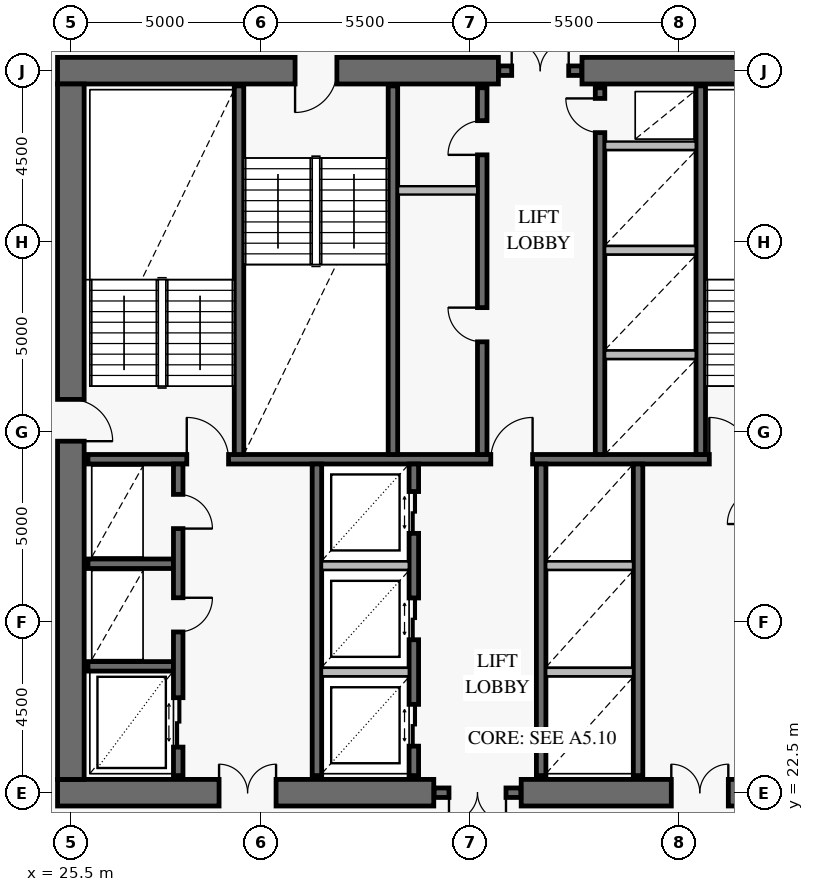
"""IFC4 building model, lengths in metres.
Left out: names, types, materials, properties, quantities, classifications, styles, units other than length and angle.
Written with IfcOpenShell. Run it as: python <this file> out.ifc"""

import sys

from ifc_helpers import new_model, si_unit, direction, frame, frame_2d, origin, place, context, subcontext, project, spatial, rectangle, extrude, element, fill, save


model = new_model("IFC4")
c1 = context("Model", 3, precision=1e-05, world=origin(), true_north=direction((0.0, 1.0)))
c2 = subcontext(c1, "Body", "Model", "MODEL_VIEW")
j1 = project(units=[si_unit("LENGTHUNIT", "METRE"), si_unit("PLANEANGLEUNIT", "RADIAN")], contexts=[c1])
p1 = place(None, origin())
s1 = spatial("IfcSite", under=j1, at=p1, CompositionType="ELEMENT")
p2 = place(p1, origin())
s2 = spatial("IfcBuilding", under=s1, at=p2, CompositionType="ELEMENT")
p3 = place(p2, frame((0.0, 0.0, 115.2)))
s3 = spatial("IfcBuildingStorey", under=s2, at=p3, CompositionType="ELEMENT", Elevation=115.2)
p4 = place(p3, frame((25.15, 22.5, 0.0), z_axis=(0.0, 0.0, 1.0), x_axis=(1.0, 0.0, 0.0)))
e1 = element("IfcWall", 1, at=p4, inside=s3, PredefinedType="SHEAR", context=c2, shape_type="SweptSolid", body=[
    extrude(rectangle(XDim=9.9, YDim=0.7, at=frame_2d((4.95, 0.0))), origin(), (0.0, 0.0, 1.0), 3.8),
])
p5 = place(p4, frame((4.25, 0.0, 0.0)))
e2 = element("IfcOpeningElement", 2, at=p5, cuts=e1, PredefinedType="OPENING", context=c2, shape_type="SweptSolid", body=[
    extrude(rectangle(XDim=1.5, YDim=2.15, at=frame_2d((0.75, 1.075))), frame((0.0, 0.362, 0.0), z_axis=(0.0, -1.0, 0.0), x_axis=(1.0, 0.0, 0.0)), (0.0, 0.0, 1.0), 0.724),
])
p6 = place(p3, frame((37.35, 22.5, 0.0), z_axis=(0.0, 0.0, 1.0), x_axis=(1.0, 0.0, 0.0)))
e3 = element("IfcWall", 3, at=p6, inside=s3, PredefinedType="SHEAR", context=c2, shape_type="SweptSolid", body=[
    extrude(rectangle(XDim=9.5, YDim=0.7, at=frame_2d((4.75, 0.0))), origin(), (0.0, 0.0, 1.0), 3.8),
])
p7 = place(p6, frame((3.95, 0.0, 0.0)))
e4 = element("IfcOpeningElement", 4, at=p7, cuts=e3, PredefinedType="OPENING", context=c2, shape_type="SweptSolid", body=[
    extrude(rectangle(XDim=1.5, YDim=2.15, at=frame_2d((0.75, 1.075))), frame((0.0, 0.362, 0.0), z_axis=(0.0, -1.0, 0.0), x_axis=(1.0, 0.0, 0.0)), (0.0, 0.0, 1.0), 0.724),
])
p8 = place(p3, frame((46.85, 41.5, 0.0), z_axis=(0.0, 0.0, 1.0), x_axis=(-1.0, 0.0, 0.0)))
e5 = element("IfcWall", 5, at=p8, inside=s3, PredefinedType="SHEAR", context=c2, shape_type="SweptSolid", body=[
    extrude(rectangle(XDim=7.9, YDim=0.7, at=frame_2d((3.95, 0.0))), origin(), (0.0, 0.0, 1.0), 3.8),
])
p9 = place(p3, frame((36.75, 41.5, 0.0), z_axis=(0.0, 0.0, 1.0), x_axis=(-1.0, 0.0, 0.0)))
e6 = element("IfcWall", 6, at=p9, inside=s3, PredefinedType="SHEAR", context=c2, shape_type="SweptSolid", body=[
    extrude(rectangle(XDim=11.6, YDim=0.7, at=frame_2d((5.8, 0.0))), origin(), (0.0, 0.0, 1.0), 3.8),
])
p10 = place(p9, frame((4.25, 0.0, 0.0)))
e7 = element("IfcOpeningElement", 7, at=p10, cuts=e6, PredefinedType="OPENING", context=c2, shape_type="SweptSolid", body=[
    extrude(rectangle(XDim=1.1, YDim=2.15, at=frame_2d((0.55, 1.075))), frame((0.0, 0.362, 0.0), z_axis=(0.0, -1.0, 0.0), x_axis=(1.0, 0.0, 0.0)), (0.0, 0.0, 1.0), 0.724),
])
p11 = place(p3, frame((25.5, 22.85, 0.0), z_axis=(0.0, 0.0, 1.0), x_axis=(0.0, 1.0, 0.0)))
e8 = element("IfcWall", 8, at=p11, inside=s3, PredefinedType="SHEAR", context=c2, shape_type="SweptSolid", body=[
    extrude(rectangle(XDim=18.3, YDim=0.7, at=frame_2d((9.15, 0.0))), origin(), (0.0, 0.0, 1.0), 3.8),
])
p12 = place(p11, frame((8.9, 0.0, 0.0)))
e9 = element("IfcOpeningElement", 9, at=p12, cuts=e8, PredefinedType="OPENING", context=c2, shape_type="SweptSolid", body=[
    extrude(rectangle(XDim=1.1, YDim=2.15, at=frame_2d((0.55, 1.075))), frame((0.0, 0.362, 0.0), z_axis=(0.0, -1.0, 0.0), x_axis=(1.0, 0.0, 0.0)), (0.0, 0.0, 1.0), 0.724),
])
p13 = place(p3, frame((35.06, 22.5, 0.0), z_axis=(0.0, 0.0, 1.0), x_axis=(1.0, 0.0, 0.0)))
e10 = element("IfcWall", 10, at=p13, inside=s3, PredefinedType="SOLIDWALL", context=c2, shape_type="SweptSolid", body=[
    extrude(rectangle(XDim=2.28, YDim=0.25, at=frame_2d((1.14, 0.0))), origin(), (0.0, 0.0, 1.0), 3.8),
])
p14 = place(p13, frame((0.39, 0.0, 0.0)))
e11 = element("IfcOpeningElement", 11, at=p14, cuts=e10, PredefinedType="OPENING", context=c2, shape_type="SweptSolid", body=[
    extrude(rectangle(XDim=1.5, YDim=2.15, at=frame_2d((0.75, 1.075))), frame((0.0, 0.137, 0.0), z_axis=(0.0, -1.0, 0.0), x_axis=(1.0, 0.0, 0.0)), (0.0, 0.0, 1.0), 0.274),
])
p15 = place(p3, frame((36.76, 41.5, 0.0), z_axis=(0.0, 0.0, 1.0), x_axis=(1.0, 0.0, 0.0)))
e12 = element("IfcWall", 12, at=p15, inside=s3, PredefinedType="SOLIDWALL", context=c2, shape_type="SweptSolid", body=[
    extrude(rectangle(XDim=2.18, YDim=0.25, at=frame_2d((1.09, 0.0))), origin(), (0.0, 0.0, 1.0), 3.8),
])
p16 = place(p15, frame((0.34, 0.0, 0.0)))
e13 = element("IfcOpeningElement", 13, at=p16, cuts=e12, PredefinedType="OPENING", context=c2, shape_type="SweptSolid", body=[
    extrude(rectangle(XDim=1.5, YDim=2.15, at=frame_2d((0.75, 1.075))), frame((0.0, 0.137, 0.0), z_axis=(0.0, -1.0, 0.0), x_axis=(1.0, 0.0, 0.0)), (0.0, 0.0, 1.0), 0.274),
])
p17 = place(p3, frame((25.95, 31.275, 0.0), z_axis=(0.0, 0.0, 1.0), x_axis=(1.0, 0.0, 0.0)))
e14 = element("IfcWall", 14, at=p17, inside=s3, PredefinedType="SOLIDWALL", context=c2, shape_type="SweptSolid", body=[
    extrude(rectangle(XDim=20.1, YDim=0.25, at=frame_2d((10.05, 0.0))), origin(), (0.0, 0.0, 1.0), 3.8),
])
p18 = place(p17, frame((2.6, 0.0, 0.0)))
e15 = element("IfcOpeningElement", 15, at=p18, cuts=e14, PredefinedType="OPENING", context=c2, shape_type="SweptSolid", body=[
    extrude(rectangle(XDim=1.1, YDim=2.15, at=frame_2d((0.55, 1.075))), frame((0.0, 0.137, 0.0), z_axis=(0.0, -1.0, 0.0), x_axis=(1.0, 0.0, 0.0)), (0.0, 0.0, 1.0), 0.274),
])
p19 = place(p17, frame((10.6, 0.0, 0.0)))
e16 = element("IfcOpeningElement", 16, at=p19, cuts=e14, PredefinedType="OPENING", context=c2, shape_type="SweptSolid", body=[
    extrude(rectangle(XDim=1.1, YDim=2.15, at=frame_2d((0.55, 1.075))), frame((0.0, 0.137, 0.0), z_axis=(0.0, -1.0, 0.0), x_axis=(1.0, 0.0, 0.0)), (0.0, 0.0, 1.0), 0.274),
])
p20 = place(p17, frame((16.35, 0.0, 0.0)))
e17 = element("IfcOpeningElement", 17, at=p20, cuts=e14, PredefinedType="OPENING", context=c2, shape_type="SweptSolid", body=[
    extrude(rectangle(XDim=1.1, YDim=2.15, at=frame_2d((0.55, 1.075))), frame((0.0, 0.137, 0.0), z_axis=(0.0, -1.0, 0.0), x_axis=(1.0, 0.0, 0.0)), (0.0, 0.0, 1.0), 0.274),
])
for number, where, z_axis, x_axis in (
    (18, (29.925, 31.4, 0.0), (0.0, 0.0, 1.0), (0.0, 1.0, 0.0)),
    (19, (33.975, 31.4, 0.0), (0.0, 0.0, 1.0), (0.0, 1.0, 0.0)),
    (20, (42.075, 31.4, 0.0), (0.0, 0.0, 1.0), (0.0, 1.0, 0.0)),
):
    element("IfcWall", number, at=place(p3, frame(where, z_axis=z_axis, x_axis=x_axis)), inside=s3, PredefinedType="SOLIDWALL", context=c2, shape_type="SweptSolid", body=[
        extrude(rectangle(XDim=9.7, YDim=0.25, at=frame_2d((4.85, 0.0))), origin(), (0.0, 0.0, 1.0), 3.8),
    ])
p21 = place(p3, frame((36.325, 31.4, 0.0), z_axis=(0.0, 0.0, 1.0), x_axis=(0.0, 1.0, 0.0)))
e21 = element("IfcWall", 21, at=p21, inside=s3, PredefinedType="SOLIDWALL", context=c2, shape_type="SweptSolid", body=[
    extrude(rectangle(XDim=9.65, YDim=0.25, at=frame_2d((4.825, 0.0))), origin(), (0.0, 0.0, 1.0), 3.8),
])
p22 = place(p21, frame((2.965, 0.0, 0.0)))
e22 = element("IfcOpeningElement", 22, at=p22, cuts=e21, PredefinedType="OPENING", context=c2, shape_type="SweptSolid", body=[
    extrude(rectangle(XDim=0.9, YDim=2.1, at=frame_2d((0.45, 1.05))), frame((0.0, 0.137, 0.0), z_axis=(0.0, -1.0, 0.0), x_axis=(1.0, 0.0, 0.0)), (0.0, 0.0, 1.0), 0.274),
])
p23 = place(p21, frame((7.885, 0.0, 0.0)))
e23 = element("IfcOpeningElement", 23, at=p23, cuts=e21, PredefinedType="OPENING", context=c2, shape_type="SweptSolid", body=[
    extrude(rectangle(XDim=0.9, YDim=2.1, at=frame_2d((0.45, 1.05))), frame((0.0, 0.137, 0.0), z_axis=(0.0, -1.0, 0.0), x_axis=(1.0, 0.0, 0.0)), (0.0, 0.0, 1.0), 0.274),
])
p24 = place(p3, frame((39.425, 31.4, 0.0), z_axis=(0.0, 0.0, 1.0), x_axis=(0.0, 1.0, 0.0)))
e24 = element("IfcWall", 24, at=p24, inside=s3, PredefinedType="SOLIDWALL", context=c2, shape_type="SweptSolid", body=[
    extrude(rectangle(XDim=9.65, YDim=0.25, at=frame_2d((4.825, 0.0))), origin(), (0.0, 0.0, 1.0), 3.8),
])
p25 = place(p24, frame((8.47, 0.0, 0.0)))
e25 = element("IfcOpeningElement", 25, at=p25, cuts=e24, PredefinedType="OPENING", context=c2, shape_type="SweptSolid", body=[
    extrude(rectangle(XDim=0.9, YDim=2.1, at=frame_2d((0.45, 1.05))), frame((0.0, 0.137, 0.0), z_axis=(0.0, -1.0, 0.0), x_axis=(1.0, 0.0, 0.0)), (0.0, 0.0, 1.0), 0.274),
])
for number, where, z_axis, x_axis in (
    (26, (25.95, 25.825, 0.0), (0.0, 0.0, 1.0), (1.0, 0.0, 0.0)),
    (27, (25.95, 28.525, 0.0), (0.0, 0.0, 1.0), (1.0, 0.0, 0.0)),
):
    element("IfcWall", number, at=place(p3, frame(where, z_axis=z_axis, x_axis=x_axis)), inside=s3, PredefinedType="SOLIDWALL", context=c2, shape_type="SweptSolid", body=[
        extrude(rectangle(XDim=2.25, YDim=0.25, at=frame_2d((1.125, 0.0))), origin(), (0.0, 0.0, 1.0), 3.8),
    ])
p26 = place(p3, frame((28.325, 22.95, 0.0), z_axis=(0.0, 0.0, 1.0), x_axis=(0.0, 1.0, 0.0)))
e28 = element("IfcWall", 28, at=p26, inside=s3, PredefinedType="SOLIDWALL", context=c2, shape_type="SweptSolid", body=[
    extrude(rectangle(XDim=8.2, YDim=0.25, at=frame_2d((4.1, 0.0))), origin(), (0.0, 0.0, 1.0), 3.8),
])
p27 = place(p26, frame((0.75, 0.0, 0.0)))
e29 = element("IfcOpeningElement", 29, at=p27, cuts=e28, PredefinedType="OPENING", context=c2, shape_type="SweptSolid", body=[
    extrude(rectangle(XDim=1.3, YDim=2.3, at=frame_2d((0.65, 1.15))), frame((0.0, 0.137, 0.0), z_axis=(0.0, -1.0, 0.0), x_axis=(1.0, 0.0, 0.0)), (0.0, 0.0, 1.0), 0.274),
])
p28 = place(p26, frame((3.78, 0.0, 0.0)))
e30 = element("IfcOpeningElement", 30, at=p28, cuts=e28, PredefinedType="OPENING", context=c2, shape_type="SweptSolid", body=[
    extrude(rectangle(XDim=0.9, YDim=2.1, at=frame_2d((0.45, 1.05))), frame((0.0, 0.137, 0.0), z_axis=(0.0, -1.0, 0.0), x_axis=(1.0, 0.0, 0.0)), (0.0, 0.0, 1.0), 0.274),
])
p29 = place(p26, frame((6.5, 0.0, 0.0)))
e31 = element("IfcOpeningElement", 31, at=p29, cuts=e28, PredefinedType="OPENING", context=c2, shape_type="SweptSolid", body=[
    extrude(rectangle(XDim=0.9, YDim=2.1, at=frame_2d((0.45, 1.05))), frame((0.0, 0.137, 0.0), z_axis=(0.0, -1.0, 0.0), x_axis=(1.0, 0.0, 0.0)), (0.0, 0.0, 1.0), 0.274),
])
p30 = place(p3, frame((31.975, 22.95, 0.0), z_axis=(0.0, 0.0, 1.0), x_axis=(0.0, 1.0, 0.0)))
e32 = element("IfcWall", 32, at=p30, inside=s3, PredefinedType="SOLIDWALL", context=c2, shape_type="SweptSolid", body=[
    extrude(rectangle(XDim=8.2, YDim=0.25, at=frame_2d((4.1, 0.0))), origin(), (0.0, 0.0, 1.0), 3.8),
])
p31 = place(p3, frame((34.525, 22.95, 0.0), z_axis=(0.0, 0.0, 1.0), x_axis=(0.0, 1.0, 0.0)))
e33 = element("IfcWall", 33, at=p31, inside=s3, PredefinedType="SOLIDWALL", context=c2, shape_type="SweptSolid", body=[
    extrude(rectangle(XDim=8.2, YDim=0.25, at=frame_2d((4.1, 0.0))), origin(), (0.0, 0.0, 1.0), 3.8),
])
p32 = place(p31, frame((0.775, 0.0, 0.0)))
e34 = element("IfcOpeningElement", 34, at=p32, cuts=e33, PredefinedType="OPENING", context=c2, shape_type="SweptSolid", body=[
    extrude(rectangle(XDim=1.1, YDim=2.2, at=frame_2d((0.55, 1.1))), frame((0.0, 0.137, 0.0), z_axis=(0.0, -1.0, 0.0), x_axis=(1.0, 0.0, 0.0)), (0.0, 0.0, 1.0), 0.274),
])
p33 = place(p31, frame((3.575, 0.0, 0.0)))
e35 = element("IfcOpeningElement", 35, at=p33, cuts=e33, PredefinedType="OPENING", context=c2, shape_type="SweptSolid", body=[
    extrude(rectangle(XDim=1.1, YDim=2.2, at=frame_2d((0.55, 1.1))), frame((0.0, 0.137, 0.0), z_axis=(0.0, -1.0, 0.0), x_axis=(1.0, 0.0, 0.0)), (0.0, 0.0, 1.0), 0.274),
])
p34 = place(p31, frame((6.375, 0.0, 0.0)))
e36 = element("IfcOpeningElement", 36, at=p34, cuts=e33, PredefinedType="OPENING", context=c2, shape_type="SweptSolid", body=[
    extrude(rectangle(XDim=1.1, YDim=2.2, at=frame_2d((0.55, 1.1))), frame((0.0, 0.137, 0.0), z_axis=(0.0, -1.0, 0.0), x_axis=(1.0, 0.0, 0.0)), (0.0, 0.0, 1.0), 0.274),
])
for number, where, z_axis, x_axis in (
    (37, (37.875, 22.95, 0.0), (0.0, 0.0, 1.0), (0.0, 1.0, 0.0)),
    (38, (40.425, 22.95, 0.0), (0.0, 0.0, 1.0), (0.0, 1.0, 0.0)),
):
    element("IfcWall", number, at=place(p3, frame(where, z_axis=z_axis, x_axis=x_axis)), inside=s3, PredefinedType="SOLIDWALL", context=c2, shape_type="SweptSolid", body=[
        extrude(rectangle(XDim=8.2, YDim=0.25, at=frame_2d((4.1, 0.0))), origin(), (0.0, 0.0, 1.0), 3.8),
    ])
p35 = place(p3, frame((34.108, 38.35, 0.0), z_axis=(0.0, 0.0, 1.0), x_axis=(1.0, 0.0, 0.0)))
e39 = element("IfcWall", 39, at=p35, inside=s3, PredefinedType="PARTITIONING", context=c2, shape_type="SweptSolid", body=[
    extrude(rectangle(XDim=2.084, YDim=0.22, at=frame_2d((1.042, 0.0))), origin(), (0.0, 0.0, 1.0), 3.55),
])
for number, where, z_axis, x_axis in (
    (40, (39.558, 34.025, 0.0), (0.0, 0.0, 1.0), (1.0, 0.0, 0.0)),
    (41, (39.558, 36.775, 0.0), (0.0, 0.0, 1.0), (1.0, 0.0, 0.0)),
    (42, (39.558, 39.525, 0.0), (0.0, 0.0, 1.0), (1.0, 0.0, 0.0)),
):
    element("IfcWall", number, at=place(p3, frame(where, z_axis=z_axis, x_axis=x_axis)), inside=s3, PredefinedType="PARTITIONING", context=c2, shape_type="SweptSolid", body=[
        extrude(rectangle(XDim=2.384, YDim=0.22, at=frame_2d((1.192, 0.0))), origin(), (0.0, 0.0, 1.0), 3.55),
    ])
for number, where, z_axis, x_axis in (
    (43, (32.108, 25.675, 0.0), (0.0, 0.0, 1.0), (1.0, 0.0, 0.0)),
    (44, (32.108, 28.475, 0.0), (0.0, 0.0, 1.0), (1.0, 0.0, 0.0)),
):
    element("IfcWall", number, at=place(p3, frame(where, z_axis=z_axis, x_axis=x_axis)), inside=s3, PredefinedType="PARTITIONING", context=c2, shape_type="SweptSolid", body=[
        extrude(rectangle(XDim=2.284, YDim=0.22, at=frame_2d((1.142, 0.0))), origin(), (0.0, 0.0, 1.0), 3.55),
    ])
for number, where, z_axis, x_axis in (
    (45, (38.008, 25.675, 0.0), (0.0, 0.0, 1.0), (1.0, 0.0, 0.0)),
    (46, (38.008, 28.475, 0.0), (0.0, 0.0, 1.0), (1.0, 0.0, 0.0)),
):
    element("IfcWall", number, at=place(p3, frame(where, z_axis=z_axis, x_axis=x_axis)), inside=s3, PredefinedType="PARTITIONING", context=c2, shape_type="SweptSolid", body=[
        extrude(rectangle(XDim=2.284, YDim=0.22, at=frame_2d((1.142, 0.0))), origin(), (0.0, 0.0, 1.0), 3.55),
    ])
p36 = place(p3, frame((20.956, 22.313, 0.0), z_axis=(0.0, 0.0, 1.0), x_axis=(0.601821242671, -0.798630823265, 0.0)))
e47 = element("IfcWall", 47, at=p36, inside=s3, PredefinedType="PARTITIONING", context=c2, shape_type="SweptSolid", body=[
    extrude(rectangle(XDim=7.393, YDim=0.12, at=frame_2d((3.697, 0.0))), origin(), (0.0, 0.0, 1.0), 2.85),
])
p37 = place(p12, frame((1.1, 0.0, 0.0), z_axis=(0.0, 0.0, 1.0), x_axis=(-1.0, 0.0, 0.0)))
e48 = element("IfcDoor", 48, at=p37, inside=s3, OperationType="SINGLE_SWING_RIGHT", PredefinedType="USERDEFINED", context=c2, shape_type="SweptSolid", body=[
    extrude(rectangle(XDim=1.1, YDim=2.15, at=frame_2d((0.55, 1.075))), frame((0.0, 0.025, 0.0), z_axis=(0.0, -1.0, 0.0), x_axis=(1.0, 0.0, 0.0)), (0.0, 0.0, 1.0), 0.05),
])
fill(e9, e48)
p38 = place(p10, origin())
e49 = element("IfcDoor", 49, at=p38, inside=s3, OperationType="SINGLE_SWING_RIGHT", PredefinedType="USERDEFINED", context=c2, shape_type="SweptSolid", body=[
    extrude(rectangle(XDim=1.1, YDim=2.15, at=frame_2d((0.55, 1.075))), frame((0.0, 0.025, 0.0), z_axis=(0.0, -1.0, 0.0), x_axis=(1.0, 0.0, 0.0)), (0.0, 0.0, 1.0), 0.05),
])
fill(e7, e49)
p39 = place(p5, origin())
e50 = element("IfcDoor", 50, at=p39, inside=s3, OperationType="DOUBLE_DOOR_SINGLE_SWING", PredefinedType="DOOR", context=c2, shape_type="SweptSolid", body=[
    extrude(rectangle(XDim=1.5, YDim=2.15, at=frame_2d((0.75, 1.075))), frame((0.0, 0.025, 0.0), z_axis=(0.0, -1.0, 0.0), x_axis=(1.0, 0.0, 0.0)), (0.0, 0.0, 1.0), 0.05),
])
fill(e2, e50)
p40 = place(p7, origin())
e51 = element("IfcDoor", 51, at=p40, inside=s3, OperationType="DOUBLE_DOOR_SINGLE_SWING", PredefinedType="DOOR", context=c2, shape_type="SweptSolid", body=[
    extrude(rectangle(XDim=1.5, YDim=2.15, at=frame_2d((0.75, 1.075))), frame((0.0, 0.025, 0.0), z_axis=(0.0, -1.0, 0.0), x_axis=(1.0, 0.0, 0.0)), (0.0, 0.0, 1.0), 0.05),
])
fill(e4, e51)
p41 = place(p14, frame((1.5, 0.0, 0.0), z_axis=(0.0, 0.0, 1.0), x_axis=(-1.0, 0.0, 0.0)))
e52 = element("IfcDoor", 52, at=p41, inside=s3, OperationType="DOUBLE_DOOR_SINGLE_SWING", PredefinedType="DOOR", context=c2, shape_type="SweptSolid", body=[
    extrude(rectangle(XDim=1.5, YDim=2.15, at=frame_2d((0.75, 1.075))), frame((0.0, 0.025, 0.0), z_axis=(0.0, -1.0, 0.0), x_axis=(1.0, 0.0, 0.0)), (0.0, 0.0, 1.0), 0.05),
])
fill(e11, e52)
p42 = place(p16, origin())
e53 = element("IfcDoor", 53, at=p42, inside=s3, OperationType="DOUBLE_DOOR_SINGLE_SWING", PredefinedType="DOOR", context=c2, shape_type="SweptSolid", body=[
    extrude(rectangle(XDim=1.5, YDim=2.15, at=frame_2d((0.75, 1.075))), frame((0.0, 0.025, 0.0), z_axis=(0.0, -1.0, 0.0), x_axis=(1.0, 0.0, 0.0)), (0.0, 0.0, 1.0), 0.05),
])
fill(e13, e53)
p43 = place(p18, origin())
e54 = element("IfcDoor", 54, at=p43, inside=s3, OperationType="SINGLE_SWING_LEFT", PredefinedType="USERDEFINED", context=c2, shape_type="SweptSolid", body=[
    extrude(rectangle(XDim=1.1, YDim=2.15, at=frame_2d((0.55, 1.075))), frame((0.0, 0.025, 0.0), z_axis=(0.0, -1.0, 0.0), x_axis=(1.0, 0.0, 0.0)), (0.0, 0.0, 1.0), 0.05),
])
fill(e15, e54)
p44 = place(p19, origin())
e55 = element("IfcDoor", 55, at=p44, inside=s3, OperationType="SINGLE_SWING_RIGHT", PredefinedType="USERDEFINED", context=c2, shape_type="SweptSolid", body=[
    extrude(rectangle(XDim=1.1, YDim=2.15, at=frame_2d((0.55, 1.075))), frame((0.0, 0.025, 0.0), z_axis=(0.0, -1.0, 0.0), x_axis=(1.0, 0.0, 0.0)), (0.0, 0.0, 1.0), 0.05),
])
fill(e16, e55)
p45 = place(p20, origin())
e56 = element("IfcDoor", 56, at=p45, inside=s3, OperationType="SINGLE_SWING_LEFT", PredefinedType="USERDEFINED", context=c2, shape_type="SweptSolid", body=[
    extrude(rectangle(XDim=1.1, YDim=2.15, at=frame_2d((0.55, 1.075))), frame((0.0, 0.025, 0.0), z_axis=(0.0, -1.0, 0.0), x_axis=(1.0, 0.0, 0.0)), (0.0, 0.0, 1.0), 0.05),
])
fill(e17, e56)
p46 = place(p22, origin())
e57 = element("IfcDoor", 57, at=p46, inside=s3, OperationType="SINGLE_SWING_RIGHT", PredefinedType="DOOR", context=c2, shape_type="SweptSolid", body=[
    extrude(rectangle(XDim=0.9, YDim=2.1, at=frame_2d((0.45, 1.05))), frame((0.0, 0.025, 0.0), z_axis=(0.0, -1.0, 0.0), x_axis=(1.0, 0.0, 0.0)), (0.0, 0.0, 1.0), 0.05),
])
fill(e22, e57)
p47 = place(p23, origin())
e58 = element("IfcDoor", 58, at=p47, inside=s3, OperationType="SINGLE_SWING_LEFT", PredefinedType="DOOR", context=c2, shape_type="SweptSolid", body=[
    extrude(rectangle(XDim=0.9, YDim=2.1, at=frame_2d((0.45, 1.05))), frame((0.0, 0.025, 0.0), z_axis=(0.0, -1.0, 0.0), x_axis=(1.0, 0.0, 0.0)), (0.0, 0.0, 1.0), 0.05),
])
fill(e23, e58)
p48 = place(p25, origin())
e59 = element("IfcDoor", 59, at=p48, inside=s3, OperationType="SINGLE_SWING_RIGHT", PredefinedType="DOOR", context=c2, shape_type="SweptSolid", body=[
    extrude(rectangle(XDim=0.9, YDim=2.1, at=frame_2d((0.45, 1.05))), frame((0.0, 0.025, 0.0), z_axis=(0.0, -1.0, 0.0), x_axis=(1.0, 0.0, 0.0)), (0.0, 0.0, 1.0), 0.05),
])
fill(e25, e59)
p49 = place(p27, frame((1.3, 0.0, 0.0), z_axis=(0.0, 0.0, 1.0), x_axis=(-1.0, 0.0, 0.0)))
e60 = element("IfcDoor", 60, at=p49, inside=s3, OperationType="DOUBLE_DOOR_SLIDING", PredefinedType="DOOR", context=c2, shape_type="SweptSolid", body=[
    extrude(rectangle(XDim=1.3, YDim=2.3, at=frame_2d((0.65, 1.15))), frame((0.0, 0.025, 0.0), z_axis=(0.0, -1.0, 0.0), x_axis=(1.0, 0.0, 0.0)), (0.0, 0.0, 1.0), 0.05),
])
fill(e29, e60)
p50 = place(p28, frame((0.9, 0.0, 0.0), z_axis=(0.0, 0.0, 1.0), x_axis=(-1.0, 0.0, 0.0)))
e61 = element("IfcDoor", 61, at=p50, inside=s3, OperationType="SINGLE_SWING_LEFT", PredefinedType="DOOR", context=c2, shape_type="SweptSolid", body=[
    extrude(rectangle(XDim=0.9, YDim=2.1, at=frame_2d((0.45, 1.05))), frame((0.0, 0.025, 0.0), z_axis=(0.0, -1.0, 0.0), x_axis=(1.0, 0.0, 0.0)), (0.0, 0.0, 1.0), 0.05),
])
fill(e30, e61)
p51 = place(p29, frame((0.9, 0.0, 0.0), z_axis=(0.0, 0.0, 1.0), x_axis=(-1.0, 0.0, 0.0)))
e62 = element("IfcDoor", 62, at=p51, inside=s3, OperationType="SINGLE_SWING_RIGHT", PredefinedType="DOOR", context=c2, shape_type="SweptSolid", body=[
    extrude(rectangle(XDim=0.9, YDim=2.1, at=frame_2d((0.45, 1.05))), frame((0.0, 0.025, 0.0), z_axis=(0.0, -1.0, 0.0), x_axis=(1.0, 0.0, 0.0)), (0.0, 0.0, 1.0), 0.05),
])
fill(e31, e62)
p52 = place(p32, frame((1.1, 0.0, 0.0), z_axis=(0.0, 0.0, 1.0), x_axis=(-1.0, 0.0, 0.0)))
e63 = element("IfcDoor", 63, at=p52, inside=s3, OperationType="DOUBLE_DOOR_SLIDING", PredefinedType="DOOR", context=c2, shape_type="SweptSolid", body=[
    extrude(rectangle(XDim=1.1, YDim=2.2, at=frame_2d((0.55, 1.1))), frame((0.0, 0.025, 0.0), z_axis=(0.0, -1.0, 0.0), x_axis=(1.0, 0.0, 0.0)), (0.0, 0.0, 1.0), 0.05),
])
fill(e34, e63)
p53 = place(p33, frame((1.1, 0.0, 0.0), z_axis=(0.0, 0.0, 1.0), x_axis=(-1.0, 0.0, 0.0)))
e64 = element("IfcDoor", 64, at=p53, inside=s3, OperationType="DOUBLE_DOOR_SLIDING", PredefinedType="DOOR", context=c2, shape_type="SweptSolid", body=[
    extrude(rectangle(XDim=1.1, YDim=2.2, at=frame_2d((0.55, 1.1))), frame((0.0, 0.025, 0.0), z_axis=(0.0, -1.0, 0.0), x_axis=(1.0, 0.0, 0.0)), (0.0, 0.0, 1.0), 0.05),
])
fill(e35, e64)
p54 = place(p34, frame((1.1, 0.0, 0.0), z_axis=(0.0, 0.0, 1.0), x_axis=(-1.0, 0.0, 0.0)))
e65 = element("IfcDoor", 65, at=p54, inside=s3, OperationType="DOUBLE_DOOR_SLIDING", PredefinedType="DOOR", context=c2, shape_type="SweptSolid", body=[
    extrude(rectangle(XDim=1.1, YDim=2.2, at=frame_2d((0.55, 1.1))), frame((0.0, 0.025, 0.0), z_axis=(0.0, -1.0, 0.0), x_axis=(1.0, 0.0, 0.0)), (0.0, 0.0, 1.0), 0.05),
])
fill(e36, e65)
save(model, sys.argv[1])
